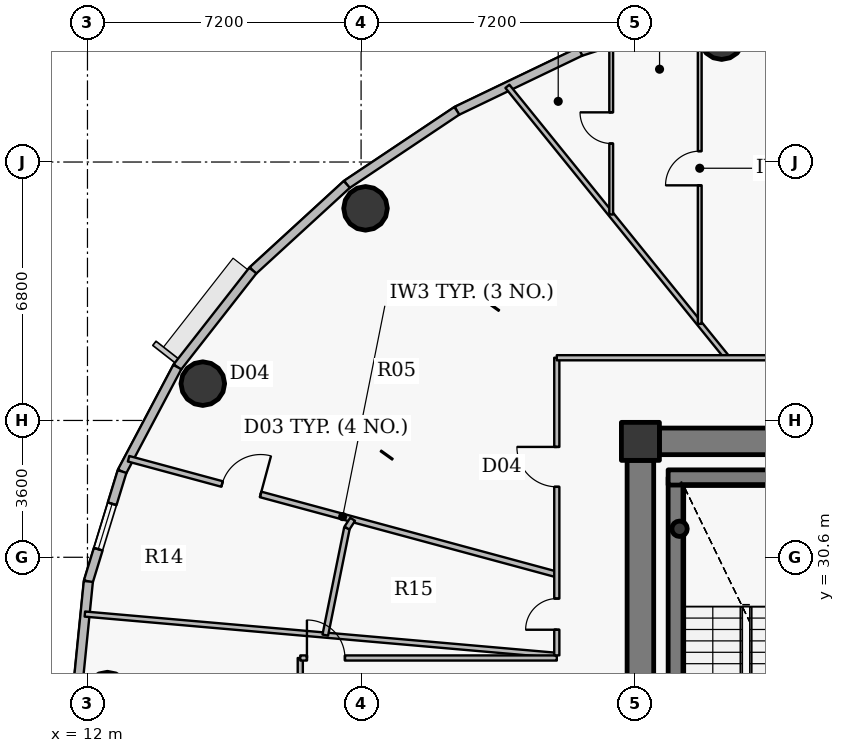
"""IFC4 building model, lengths in metres.
Left out: names, types, materials, properties, quantities, classifications, styles, units other than length and angle.
Written with IfcOpenShell. Run it as: python <this file> out.ifc"""

import sys

from ifc_helpers import new_model, si_unit, direction, frame, frame_2d, origin, origin_2d, place, context, subcontext, project, spatial, rectangle, hollow_circle, extrude, source, transform, mapped, element, fill, save


model = new_model("IFC4")
c1 = context("Model", 3, precision=1e-05, world=origin(), true_north=direction((0.0, 1.0)))
c2 = subcontext(c1, "Body", "Model", "MODEL_VIEW")
j1 = project(units=[si_unit("LENGTHUNIT", "METRE"), si_unit("PLANEANGLEUNIT", "RADIAN")], contexts=[c1])
p1 = place(None, origin())
s1 = spatial("IfcSite", under=j1, at=p1, CompositionType="ELEMENT")
p2 = place(p1, origin())
s2 = spatial("IfcBuilding", under=s1, at=p2, CompositionType="ELEMENT")
p3 = place(p2, frame((0.0, 0.0, 247.8)))
s3 = spatial("IfcBuildingStorey", under=s2, at=p3, CompositionType="ELEMENT", Elevation=247.8)
p4 = place(p3, frame((26.55, 33.65, 0.0), z_axis=(0.0, 0.0, 1.0), x_axis=(1.0, 0.0, 0.0)))
e1 = element("IfcColumn", 1, at=p4, inside=s3, PredefinedType="COLUMN", context=c2, shape_type="SweptSolid", body=[
    extrude(rectangle(XDim=1.0, YDim=1.0, at=origin_2d()), origin(), (0.0, 0.0, 1.0), 3.75),
])
p5 = place(p3, frame((27.48, 24.1, 0.0), z_axis=(0.0, 0.0, 1.0), x_axis=(0.0, 1.0, 0.0)))
e2 = element("IfcWall", 2, at=p5, inside=s3, PredefinedType="SHEAR", context=c2, shape_type="SweptSolid", body=[
    extrude(rectangle(XDim=8.6, YDim=0.4, at=frame_2d((4.3, 0.0))), origin(), (0.0, 0.0, 1.0), 3.75),
])
p6 = place(p3, frame((27.28, 32.7, 0.0), z_axis=(0.0, 0.0, 1.0), x_axis=(1.0, 0.0, 0.0)))
e3 = element("IfcWall", 3, at=p6, inside=s3, PredefinedType="SHEAR", context=c2, shape_type="SweptSolid", body=[
    extrude(rectangle(XDim=4.1, YDim=0.4, at=frame_2d((2.05, 0.0))), origin(), (0.0, 0.0, 1.0), 3.75),
])
p7 = place(p3, frame((27.58, 31.35, 0.0), z_axis=(0.0, 0.0, 1.0), x_axis=(1.0, 0.0, 0.0)))
e4 = element("IfcColumn", 4, at=p7, inside=s3, PredefinedType="COLUMN", context=c2, shape_type="SweptSolid", body=[
    extrude(hollow_circle(Radius=0.203, WallThickness=0.016, at=origin_2d()), origin(), (0.0, 0.0, 1.0), 3.75),
])
p8 = place(p3, frame((27.05, 33.65, 0.0), z_axis=(0.0, 0.0, 1.0), x_axis=(1.0, 0.0, 0.0)))
e5 = element("IfcWall", 5, at=p8, inside=s3, PredefinedType="SHEAR", context=c2, shape_type="SweptSolid", body=[
    extrude(rectangle(XDim=17.9, YDim=0.7, at=frame_2d((8.95, 0.0))), origin(), (0.0, 0.0, 1.0), 3.05),
])
p9 = place(p8, frame((13.675, 0.0, 0.0)))
e6 = element("IfcOpeningElement", 6, at=p9, cuts=e5, PredefinedType="OPENING", context=c2, shape_type="SweptSolid", body=[
    extrude(rectangle(XDim=1.15, YDim=2.15, at=origin_2d()), frame((0.575, 0.36, 1.075), z_axis=(0.0, -1.0, 0.0), x_axis=(1.0, 0.0, 0.0)), (0.0, 0.0, 1.0), 0.72),
])
p10 = place(p3, frame((26.55, 20.85, 0.0), z_axis=(0.0, 0.0, 1.0), x_axis=(0.0, 1.0, 0.0)))
e7 = element("IfcWall", 7, at=p10, inside=s3, PredefinedType="SHEAR", context=c2, shape_type="SweptSolid", body=[
    extrude(rectangle(XDim=12.3, YDim=0.7, at=frame_2d((6.15, 0.0))), origin(), (0.0, 0.0, 1.0), 3.05),
])
p11 = place(p10, frame((1.085, 0.0, 0.0)))
e8 = element("IfcOpeningElement", 8, at=p11, cuts=e7, PredefinedType="OPENING", context=c2, shape_type="SweptSolid", body=[
    extrude(rectangle(XDim=1.15, YDim=2.15, at=origin_2d()), frame((0.575, 0.36, 1.075), z_axis=(0.0, -1.0, 0.0), x_axis=(1.0, 0.0, 0.0)), (0.0, 0.0, 1.0), 0.72),
])
for number, where, z_axis, x_axis in (
    (9, (28.688, 44.273, 0.0), (0.0, 0.0, 1.0), (1.0, 0.0, 0.0)),
    (10, (19.317, 39.781, 0.0), (0.0, 0.0, 1.0), (1.0, 0.0, 0.0)),
    (11, (15.035, 35.169, 0.0), (0.0, 0.0, 1.0), (1.0, 0.0, 0.0)),
    (12, (12.525, 27.0, 0.0), (0.0, 0.0, 1.0), (1.0, 0.0, 0.0)),
):
    element("IfcColumn", number, at=place(p3, frame(where, z_axis=z_axis, x_axis=x_axis)), inside=s3, PredefinedType="COLUMN", context=c2, shape_type="SweptSolid", body=[
        extrude(hollow_circle(Radius=0.575, WallThickness=0.036, at=origin_2d()), origin(), (0.0, 0.0, 1.0), 3.75),
    ])
p12 = place(p3, frame((24.969, 43.906, 0.0), z_axis=(0.0, 0.0, 1.0), x_axis=(0.951210789182, 0.308541787354, 0.0)))
e13 = element("IfcWall", 13, at=p12, inside=s3, PredefinedType="SOLIDWALL", context=c2, shape_type="SweptSolid", body=[
    extrude(rectangle(XDim=3.702, YDim=0.24, at=frame_2d((1.851, 0.0))), origin(), (0.0, 0.0, 1.0), 3.5),
])
p13 = place(p12, frame((1.223, 0.0, 0.9)))
e14 = element("IfcOpeningElement", 14, at=p13, cuts=e13, PredefinedType="OPENING", context=c2, shape_type="SweptSolid", body=[
    extrude(rectangle(XDim=1.25, YDim=1.65, at=origin_2d()), frame((0.625, 0.13, 0.825), z_axis=(0.0, -1.0, 0.0), x_axis=(1.0, 0.0, 0.0)), (0.0, 0.0, 1.0), 0.26),
])
p14 = place(p3, frame((21.72, 42.348, 0.0), z_axis=(0.0, 0.0, 1.0), x_axis=(0.901598104751, 0.432574684313, 0.0)))
e15 = element("IfcWall", 15, at=p14, inside=s3, PredefinedType="SOLIDWALL", context=c2, shape_type="SweptSolid", body=[
    extrude(rectangle(XDim=3.604, YDim=0.24, at=frame_2d((1.802, 0.0))), origin(), (0.0, 0.0, 1.0), 3.5),
])
p15 = place(p3, frame((18.824, 40.411, 0.0), z_axis=(0.0, 0.0, 1.0), x_axis=(0.831262496074, 0.555880079352, 0.0)))
e16 = element("IfcWall", 16, at=p15, inside=s3, PredefinedType="SOLIDWALL", context=c2, shape_type="SweptSolid", body=[
    extrude(rectangle(XDim=3.484, YDim=0.24, at=frame_2d((1.742, 0.0))), origin(), (0.0, 0.0, 1.0), 3.5),
])
p16 = place(p3, frame((16.352, 38.145, 0.0), z_axis=(0.0, 0.0, 1.0), x_axis=(0.737123922599, 0.675757591694, 0.0)))
e17 = element("IfcWall", 17, at=p16, inside=s3, PredefinedType="SOLIDWALL", context=c2, shape_type="SweptSolid", body=[
    extrude(rectangle(XDim=3.354, YDim=0.24, at=frame_2d((1.677, 0.0))), origin(), (0.0, 0.0, 1.0), 3.5),
])
p17 = place(p3, frame((14.364, 35.605, 0.0), z_axis=(0.0, 0.0, 1.0), x_axis=(0.616312344705, 0.787501805562, 0.0)))
e18 = element("IfcWall", 18, at=p17, inside=s3, PredefinedType="SOLIDWALL", context=c2, shape_type="SweptSolid", body=[
    extrude(rectangle(XDim=3.225, YDim=0.24, at=frame_2d((1.612, 0.0))), origin(), (0.0, 0.0, 1.0), 3.5),
])
p18 = place(p3, frame((12.91, 32.856, 0.0), z_axis=(0.0, 0.0, 1.0), x_axis=(0.46766049993, 0.883908172157, 0.0)))
e19 = element("IfcWall", 19, at=p18, inside=s3, PredefinedType="SOLIDWALL", context=c2, shape_type="SweptSolid", body=[
    extrude(rectangle(XDim=3.11, YDim=0.24, at=frame_2d((1.555, 0.0))), origin(), (0.0, 0.0, 1.0), 3.5),
])
p19 = place(p3, frame((12.023, 29.964, 0.0), z_axis=(0.0, 0.0, 1.0), x_axis=(0.293132907334, 0.95607170162, 0.0)))
e20 = element("IfcWall", 20, at=p19, inside=s3, PredefinedType="SOLIDWALL", context=c2, shape_type="SweptSolid", body=[
    extrude(rectangle(XDim=3.025, YDim=0.24, at=frame_2d((1.512, 0.0))), origin(), (0.0, 0.0, 1.0), 3.5),
])
p20 = place(p19, frame((0.887, 0.0, 0.9)))
e21 = element("IfcOpeningElement", 21, at=p20, cuts=e20, PredefinedType="OPENING", context=c2, shape_type="SweptSolid", body=[
    extrude(rectangle(XDim=1.25, YDim=1.65, at=origin_2d()), frame((0.625, 0.13, 0.825), z_axis=(0.0, -1.0, 0.0), x_axis=(1.0, 0.0, 0.0)), (0.0, 0.0, 1.0), 0.26),
])
p21 = place(p3, frame((11.725, 27.0, 0.0), z_axis=(0.0, 0.0, 1.0), x_axis=(0.099990595253, 0.994988382274, 0.0)))
e22 = element("IfcWall", 22, at=p21, inside=s3, PredefinedType="SOLIDWALL", context=c2, shape_type="SweptSolid", body=[
    extrude(rectangle(XDim=2.979, YDim=0.24, at=frame_2d((1.489, 0.0))), origin(), (0.0, 0.0, 1.0), 3.5),
])
p22 = place(p3, frame((11.932, 29.106, 0.0), z_axis=(0.0, 0.0, 1.0), x_axis=(0.996194886619, -0.08715358784, 0.0)))
e23 = element("IfcWall", 23, at=p22, inside=s3, PredefinedType="PARTITIONING", context=c2, shape_type="SweptSolid", body=[
    extrude(rectangle(XDim=12.466, YDim=0.135, at=frame_2d((6.233, 0.0))), origin(), (0.0, 0.0, 1.0), 2.985),
])
p23 = place(p3, frame((13.082, 33.192, 0.0), z_axis=(0.0, 0.0, 1.0), x_axis=(0.965379480797, -0.26084949311, 0.0)))
e24 = element("IfcWall", 24, at=p23, inside=s3, PredefinedType="PARTITIONING", context=c2, shape_type="SweptSolid", body=[
    extrude(rectangle(XDim=11.672, YDim=0.15, at=frame_2d((5.836, 0.0))), origin(), (0.0, 0.0, 1.0), 2.985),
])
p24 = place(p23, frame((2.549, 0.0, 0.0)))
e25 = element("IfcOpeningElement", 25, at=p24, cuts=e24, PredefinedType="OPENING", context=c2, shape_type="SweptSolid", body=[
    extrude(rectangle(XDim=1.05, YDim=2.15, at=origin_2d()), frame((0.525, 0.085, 1.075), z_axis=(0.0, -1.0, 0.0), x_axis=(1.0, 0.0, 0.0)), (0.0, 0.0, 1.0), 0.17),
])
p25 = place(p3, frame((17.6, 23.328, 0.0), z_axis=(0.0, 0.0, 1.0), x_axis=(0.0, 1.0, 0.0)))
e26 = element("IfcWall", 26, at=p25, inside=s3, PredefinedType="PARTITIONING", context=c2, shape_type="SweptSolid", body=[
    extrude(rectangle(XDim=4.622, YDim=0.135, at=frame_2d((2.311, 0.0))), origin(), (0.0, 0.0, 1.0), 2.935),
])
p26 = place(p3, frame((17.6, 27.95, 0.0), z_axis=(0.0, 0.0, 1.0), x_axis=(1.0, 0.0, 0.0)))
e27 = element("IfcWall", 27, at=p26, inside=s3, PredefinedType="PARTITIONING", context=c2, shape_type="SweptSolid", body=[
    extrude(rectangle(XDim=6.75, YDim=0.135, at=frame_2d((3.375, 0.0))), origin(), (0.0, 0.0, 1.0), 3.5),
])
p27 = place(p26, frame((0.175, 0.0, 0.0)))
e28 = element("IfcOpeningElement", 28, at=p27, cuts=e27, PredefinedType="OPENING", context=c2, shape_type="SweptSolid", body=[
    extrude(rectangle(XDim=1.0, YDim=2.15, at=origin_2d()), frame((0.5, 0.078, 1.075), z_axis=(0.0, -1.0, 0.0), x_axis=(1.0, 0.0, 0.0)), (0.0, 0.0, 1.0), 0.155),
])
p28 = place(p3, frame((18.258, 28.552, 0.0), z_axis=(0.0, 0.0, 1.0), x_axis=(0.198206962436, 0.980160191011, 0.0)))
e29 = element("IfcWall", 29, at=p28, inside=s3, PredefinedType="PARTITIONING", context=c2, shape_type="SweptSolid", body=[
    extrude(rectangle(XDim=2.874, YDim=0.15, at=frame_2d((1.437, 0.0))), origin(), (0.0, 0.0, 1.0), 3.5),
])
p29 = place(p3, frame((18.828, 31.369, 0.0), z_axis=(0.0, 0.0, 1.0), x_axis=(0.545861595592, 0.837875359739, 0.0)))
e30 = element("IfcWall", 30, at=p29, inside=s3, PredefinedType="PARTITIONING", context=c2, shape_type="SweptSolid", body=[
    extrude(rectangle(XDim=0.275, YDim=0.15, at=frame_2d((0.138, 0.0))), origin(), (0.0, 0.0, 1.0), 3.5),
])
p30 = place(p3, frame((23.05, 42.991, 0.0), z_axis=(0.0, 0.0, 1.0), x_axis=(0.629320507303, -0.777145867317, 0.0)))
e31 = element("IfcWall", 31, at=p30, inside=s3, PredefinedType="PARTITIONING", context=c2, shape_type="SweptSolid", body=[
    extrude(rectangle(XDim=9.189, YDim=0.135, at=frame_2d((4.595, 0.0))), origin(), (0.0, 0.0, 1.0), 2.985),
])
p31 = place(p3, frame((24.35, 28.019, 0.0), z_axis=(0.0, 0.0, 1.0), x_axis=(0.0, 1.0, 0.0)))
e32 = element("IfcWall", 32, at=p31, inside=s3, PredefinedType="PARTITIONING", context=c2, shape_type="SweptSolid", body=[
    extrude(rectangle(XDim=7.831, YDim=0.135, at=frame_2d((3.916, 0.0))), origin(), (0.0, 0.0, 1.0), 2.935),
])
p32 = place(p31, frame((4.435, 0.0, 0.0)))
e33 = element("IfcOpeningElement", 33, at=p32, cuts=e32, PredefinedType="OPENING", context=c2, shape_type="SweptSolid", body=[
    extrude(rectangle(XDim=1.05, YDim=2.15, at=origin_2d()), frame((0.525, 0.078, 1.075), z_axis=(0.0, -1.0, 0.0), x_axis=(1.0, 0.0, 0.0)), (0.0, 0.0, 1.0), 0.155),
])
p33 = place(p31, frame((0.674, 0.0, 0.0)))
e34 = element("IfcOpeningElement", 34, at=p33, cuts=e32, PredefinedType="OPENING", context=c2, shape_type="SweptSolid", body=[
    extrude(rectangle(XDim=0.82, YDim=2.1, at=origin_2d()), frame((0.41, 0.078, 1.05), z_axis=(0.0, -1.0, 0.0), x_axis=(1.0, 0.0, 0.0)), (0.0, 0.0, 1.0), 0.155),
])
p34 = place(p3, frame((24.35, 35.85, 0.0), z_axis=(0.0, 0.0, 1.0), x_axis=(1.0, 0.0, 0.0)))
e35 = element("IfcWall", 35, at=p34, inside=s3, PredefinedType="PARTITIONING", context=c2, shape_type="SweptSolid", body=[
    extrude(rectangle(XDim=26.218, YDim=0.135, at=frame_2d((13.109, 0.0))), origin(), (0.0, 0.0, 1.0), 2.935),
])
p35 = place(p34, frame((22.062, 0.0, 0.0)))
e36 = element("IfcOpeningElement", 36, at=p35, cuts=e35, PredefinedType="OPENING", context=c2, shape_type="SweptSolid", body=[
    extrude(rectangle(XDim=1.0, YDim=2.15, at=origin_2d()), frame((0.5, 0.078, 1.075), z_axis=(0.0, -1.0, 0.0), x_axis=(1.0, 0.0, 0.0)), (0.0, 0.0, 1.0), 0.155),
])
p36 = place(p34, frame((11.214, 0.0, 0.0)))
e37 = element("IfcOpeningElement", 37, at=p36, cuts=e35, PredefinedType="OPENING", context=c2, shape_type="SweptSolid", body=[
    extrude(rectangle(XDim=1.0, YDim=2.15, at=origin_2d()), frame((0.5, 0.078, 1.075), z_axis=(0.0, -1.0, 0.0), x_axis=(1.0, 0.0, 0.0)), (0.0, 0.0, 1.0), 0.155),
])
p37 = place(p3, frame((25.782, 39.619, 0.0), z_axis=(0.0, 0.0, 1.0), x_axis=(0.0, 1.0, 0.0)))
e38 = element("IfcWall", 38, at=p37, inside=s3, PredefinedType="PARTITIONING", context=c2, shape_type="SweptSolid", body=[
    extrude(rectangle(XDim=4.557, YDim=0.1, at=frame_2d((2.278, 0.0))), origin(), (0.0, 0.0, 1.0), 2.985),
])
p38 = place(p37, frame((1.868, 0.0, 0.0)))
e39 = element("IfcOpeningElement", 39, at=p38, cuts=e38, PredefinedType="OPENING", context=c2, shape_type="SweptSolid", body=[
    extrude(rectangle(XDim=0.82, YDim=2.1, at=origin_2d()), frame((0.41, 0.06, 1.05), z_axis=(0.0, -1.0, 0.0), x_axis=(1.0, 0.0, 0.0)), (0.0, 0.0, 1.0), 0.12),
])
p39 = place(p3, frame((28.111, 36.742, 0.0), z_axis=(0.0, 0.0, 1.0), x_axis=(0.0, 1.0, 0.0)))
e40 = element("IfcWall", 40, at=p39, inside=s3, PredefinedType="PARTITIONING", context=c2, shape_type="SweptSolid", body=[
    extrude(rectangle(XDim=8.189, YDim=0.1, at=frame_2d((4.095, 0.0))), origin(), (0.0, 0.0, 1.0), 2.985),
])
p40 = place(p39, frame((3.645, 0.0, 0.0)))
e41 = element("IfcOpeningElement", 41, at=p40, cuts=e40, PredefinedType="OPENING", context=c2, shape_type="SweptSolid", body=[
    extrude(rectangle(XDim=0.9, YDim=2.1, at=origin_2d()), frame((0.45, 0.06, 1.05), z_axis=(0.0, -1.0, 0.0), x_axis=(1.0, 0.0, 0.0)), (0.0, 0.0, 1.0), 0.12),
])
p41 = place(p3, frame((27.04, 34.0, 0.0), z_axis=(0.0, 0.0, 1.0), x_axis=(-1.0, 0.0, 0.0)))
e42 = element("IfcWall", 42, at=p41, inside=s3, PredefinedType="PARTITIONING", context=c2, shape_type="SweptSolid", body=[
    extrude(rectangle(XDim=0.84, YDim=0.135, at=frame_2d((0.42, 0.0))), origin(), (0.0, 0.0, 1.0), 2.935),
])
p42 = place(p3, frame((26.2, 33.692, 0.0), z_axis=(0.0, 0.0, 1.0), x_axis=(0.0, -1.0, 0.0)))
e43 = element("IfcWall", 43, at=p42, inside=s3, PredefinedType="PARTITIONING", context=c2, shape_type="SweptSolid", body=[
    extrude(rectangle(XDim=0.532, YDim=0.135, at=frame_2d((0.266, 0.0))), origin(), (0.0, 0.0, 1.0), 3.5),
])
m1 = source(origin(), c2, "Body", "SweptSolid", [
    extrude(rectangle(XDim=1.25, YDim=1.65, at=origin_2d()), frame((0.625, 0.03, 0.825), z_axis=(0.0, -1.0, 0.0), x_axis=(1.0, 0.0, 0.0)), (0.0, 0.0, 1.0), 0.06),
])
p43 = place(p20, origin())
e44 = element("IfcWindow", 44, at=p43, inside=s3, PartitioningType="SINGLE_PANEL", PredefinedType="WINDOW", context=c2, shape_type="MappedRepresentation", body=[
    mapped(m1, transform((0.0, 0.0, 0.0), x_axis=(1.0, 0.0, 0.0), y_axis=(0.0, 1.0, 0.0), z_axis=(0.0, 0.0, 1.0), scale=1.0)),
])
fill(e21, e44)
m2 = source(origin(), c2, "Body", "SweptSolid", [
    extrude(rectangle(XDim=1.0, YDim=2.15, at=origin_2d()), frame((0.5, 0.025, 1.075), z_axis=(0.0, -1.0, 0.0), x_axis=(1.0, 0.0, 0.0)), (0.0, 0.0, 1.0), 0.05),
])
p44 = place(p27, origin())
e45 = element("IfcDoor", 45, at=p44, inside=s3, OperationType="SINGLE_SWING_LEFT", PredefinedType="DOOR", context=c2, shape_type="MappedRepresentation", body=[
    mapped(m2, transform((0.0, 0.0, 0.0), x_axis=(1.0, 0.0, 0.0), y_axis=(0.0, 1.0, 0.0), z_axis=(0.0, 0.0, 1.0), scale=1.0)),
])
fill(e28, e45)
m3 = source(origin(), c2, "Body", "SweptSolid", [
    extrude(rectangle(XDim=0.9, YDim=2.1, at=origin_2d()), frame((0.45, 0.025, 1.05), z_axis=(0.0, -1.0, 0.0), x_axis=(1.0, 0.0, 0.0)), (0.0, 0.0, 1.0), 0.05),
])
p45 = place(p40, origin())
e46 = element("IfcDoor", 46, at=p45, inside=s3, OperationType="SINGLE_SWING_LEFT", PredefinedType="DOOR", context=c2, shape_type="MappedRepresentation", body=[
    mapped(m3, transform((0.0, 0.0, 0.0), x_axis=(1.0, 0.0, 0.0), y_axis=(0.0, 1.0, 0.0), z_axis=(0.0, 0.0, 1.0), scale=1.0)),
])
fill(e41, e46)
m4 = source(origin(), c2, "Body", "SweptSolid", [
    extrude(rectangle(XDim=0.82, YDim=2.1, at=origin_2d()), frame((0.41, 0.025, 1.05), z_axis=(0.0, -1.0, 0.0), x_axis=(1.0, 0.0, 0.0)), (0.0, 0.0, 1.0), 0.05),
])
p46 = place(p38, origin())
e47 = element("IfcDoor", 47, at=p46, inside=s3, OperationType="SINGLE_SWING_RIGHT", PredefinedType="DOOR", context=c2, shape_type="MappedRepresentation", body=[
    mapped(m4, transform((0.0, 0.0, 0.0), x_axis=(1.0, 0.0, 0.0), y_axis=(0.0, 1.0, 0.0), z_axis=(0.0, 0.0, 1.0), scale=1.0)),
])
fill(e39, e47)
m5 = source(origin(), c2, "Body", "SweptSolid", [
    extrude(rectangle(XDim=1.05, YDim=2.15, at=origin_2d()), frame((0.525, 0.025, 1.075), z_axis=(0.0, -1.0, 0.0), x_axis=(1.0, 0.0, 0.0)), (0.0, 0.0, 1.0), 0.05),
])
p47 = place(p32, origin())
e48 = element("IfcDoor", 48, at=p47, inside=s3, OperationType="SINGLE_SWING_RIGHT", PredefinedType="DOOR", context=c2, shape_type="MappedRepresentation", body=[
    mapped(m5, transform((0.0, 0.0, 0.0), x_axis=(1.0, 0.0, 0.0), y_axis=(0.0, 1.0, 0.0), z_axis=(0.0, 0.0, 1.0), scale=1.0)),
])
fill(e33, e48)
p48 = place(p33, origin())
e49 = element("IfcDoor", 49, at=p48, inside=s3, OperationType="SINGLE_SWING_LEFT", PredefinedType="DOOR", context=c2, shape_type="MappedRepresentation", body=[
    mapped(m4, transform((0.0, 0.0, 0.0), x_axis=(1.0, 0.0, 0.0), y_axis=(0.0, 1.0, 0.0), z_axis=(0.0, 0.0, 1.0), scale=1.0)),
])
fill(e34, e49)
p49 = place(p24, origin())
e50 = element("IfcDoor", 50, at=p49, inside=s3, OperationType="SINGLE_SWING_RIGHT", PredefinedType="DOOR", context=c2, shape_type="MappedRepresentation", body=[
    mapped(m5, transform((0.0, 0.0, 0.0), x_axis=(1.0, 0.0, 0.0), y_axis=(0.0, 1.0, 0.0), z_axis=(0.0, 0.0, 1.0), scale=1.0)),
])
fill(e25, e50)
save(model, sys.argv[1])
